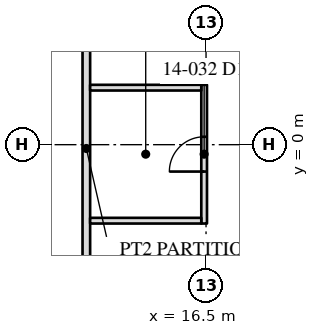
"""IFC4 building model, lengths in metres.
Left out: names, types, materials, properties, quantities, classifications, styles, units other than length and angle.
Written with IfcOpenShell. Run it as: python <this file> out.ifc"""

import sys

from ifc_helpers import new_model, si_unit, direction, frame, frame_2d, origin, place, context, subcontext, project, spatial, rectangle, extrude, element, fill, save


model = new_model("IFC4")
c1 = context("Model", 3, precision=1e-05, world=origin(), true_north=direction((0.0, 1.0)))
c2 = subcontext(c1, "Body", "Model", "MODEL_VIEW")
j1 = project(units=[si_unit("LENGTHUNIT", "METRE"), si_unit("PLANEANGLEUNIT", "RADIAN")], contexts=[c1])
p1 = place(None, origin())
s1 = spatial("IfcSite", under=j1, at=p1, CompositionType="ELEMENT")
p2 = place(p1, origin())
s2 = spatial("IfcBuilding", under=s1, at=p2, CompositionType="ELEMENT")
p3 = place(p2, frame((0.0, 0.0, 61.1)))
s3 = spatial("IfcBuildingStorey", under=s2, at=p3, CompositionType="ELEMENT", Elevation=61.1)
p4 = place(p3, frame((13.35, -13.45, 0.0), z_axis=(0.0, 0.0, 1.0), x_axis=(0.0, 1.0, 0.0)))
e1 = element("IfcWall", 1, at=p4, inside=s3, PredefinedType="PARTITIONING", context=c2, shape_type="SweptSolid", body=[
    extrude(rectangle(XDim=26.7, YDim=0.2, at=frame_2d((13.35, 0.0))), origin(), (0.0, 0.0, 1.0), 3.91),
])
p5 = place(p4, frame((5.992, 0.0, 0.0)))
e2 = element("IfcOpeningElement", 2, at=p5, cuts=e1, PredefinedType="OPENING", context=c2, shape_type="SweptSolid", body=[
    extrude(rectangle(XDim=0.915, YDim=2.134, at=frame_2d((0.458, 1.067))), frame((0.0, 0.11, 0.0), z_axis=(0.0, -1.0, 0.0), x_axis=(1.0, 0.0, 0.0)), (0.0, 0.0, 1.0), 0.22),
])
p6 = place(p3, frame((16.45, -2.075, 0.0), z_axis=(0.0, 0.0, 1.0), x_axis=(0.0, 1.0, 0.0)))
e3 = element("IfcWall", 3, at=p6, inside=s3, PredefinedType="PARTITIONING", context=c2, shape_type="SweptSolid", body=[
    extrude(rectangle(XDim=3.65, YDim=0.15, at=frame_2d((1.825, 0.0))), origin(), (0.0, 0.0, 1.0), 3.91),
])
p7 = place(p6, frame((1.367, 0.0, 0.0)))
e4 = element("IfcOpeningElement", 4, at=p7, cuts=e3, PredefinedType="OPENING", context=c2, shape_type="SweptSolid", body=[
    extrude(rectangle(XDim=0.915, YDim=2.134, at=frame_2d((0.458, 1.067))), frame((0.0, 0.085, 0.0), z_axis=(0.0, -1.0, 0.0), x_axis=(1.0, 0.0, 0.0)), (0.0, 0.0, 1.0), 0.17),
])
for number, where, z_axis, x_axis in (
    (5, (16.375, -2.0, 0.0), (0.0, 0.0, 1.0), (-1.0, 0.0, 0.0)),
    (6, (16.375, 1.5, 0.0), (0.0, 0.0, 1.0), (-1.0, 0.0, 0.0)),
):
    element("IfcWall", number, at=place(p3, frame(where, z_axis=z_axis, x_axis=x_axis)), inside=s3, PredefinedType="PARTITIONING", context=c2, shape_type="SweptSolid", body=[
        extrude(rectangle(XDim=2.925, YDim=0.15, at=frame_2d((1.462, 0.0))), origin(), (0.0, 0.0, 1.0), 3.91),
    ])
p8 = place(p7, origin())
e7 = element("IfcDoor", 7, at=p8, inside=s3, OperationType="SINGLE_SWING_LEFT", PredefinedType="DOOR", context=c2, shape_type="SweptSolid", body=[
    extrude(rectangle(XDim=0.915, YDim=2.134, at=frame_2d((0.458, 1.067))), frame((0.0, 0.025, 0.0), z_axis=(0.0, -1.0, 0.0), x_axis=(1.0, 0.0, 0.0)), (0.0, 0.0, 1.0), 0.05),
])
fill(e4, e7)
save(model, sys.argv[1])
